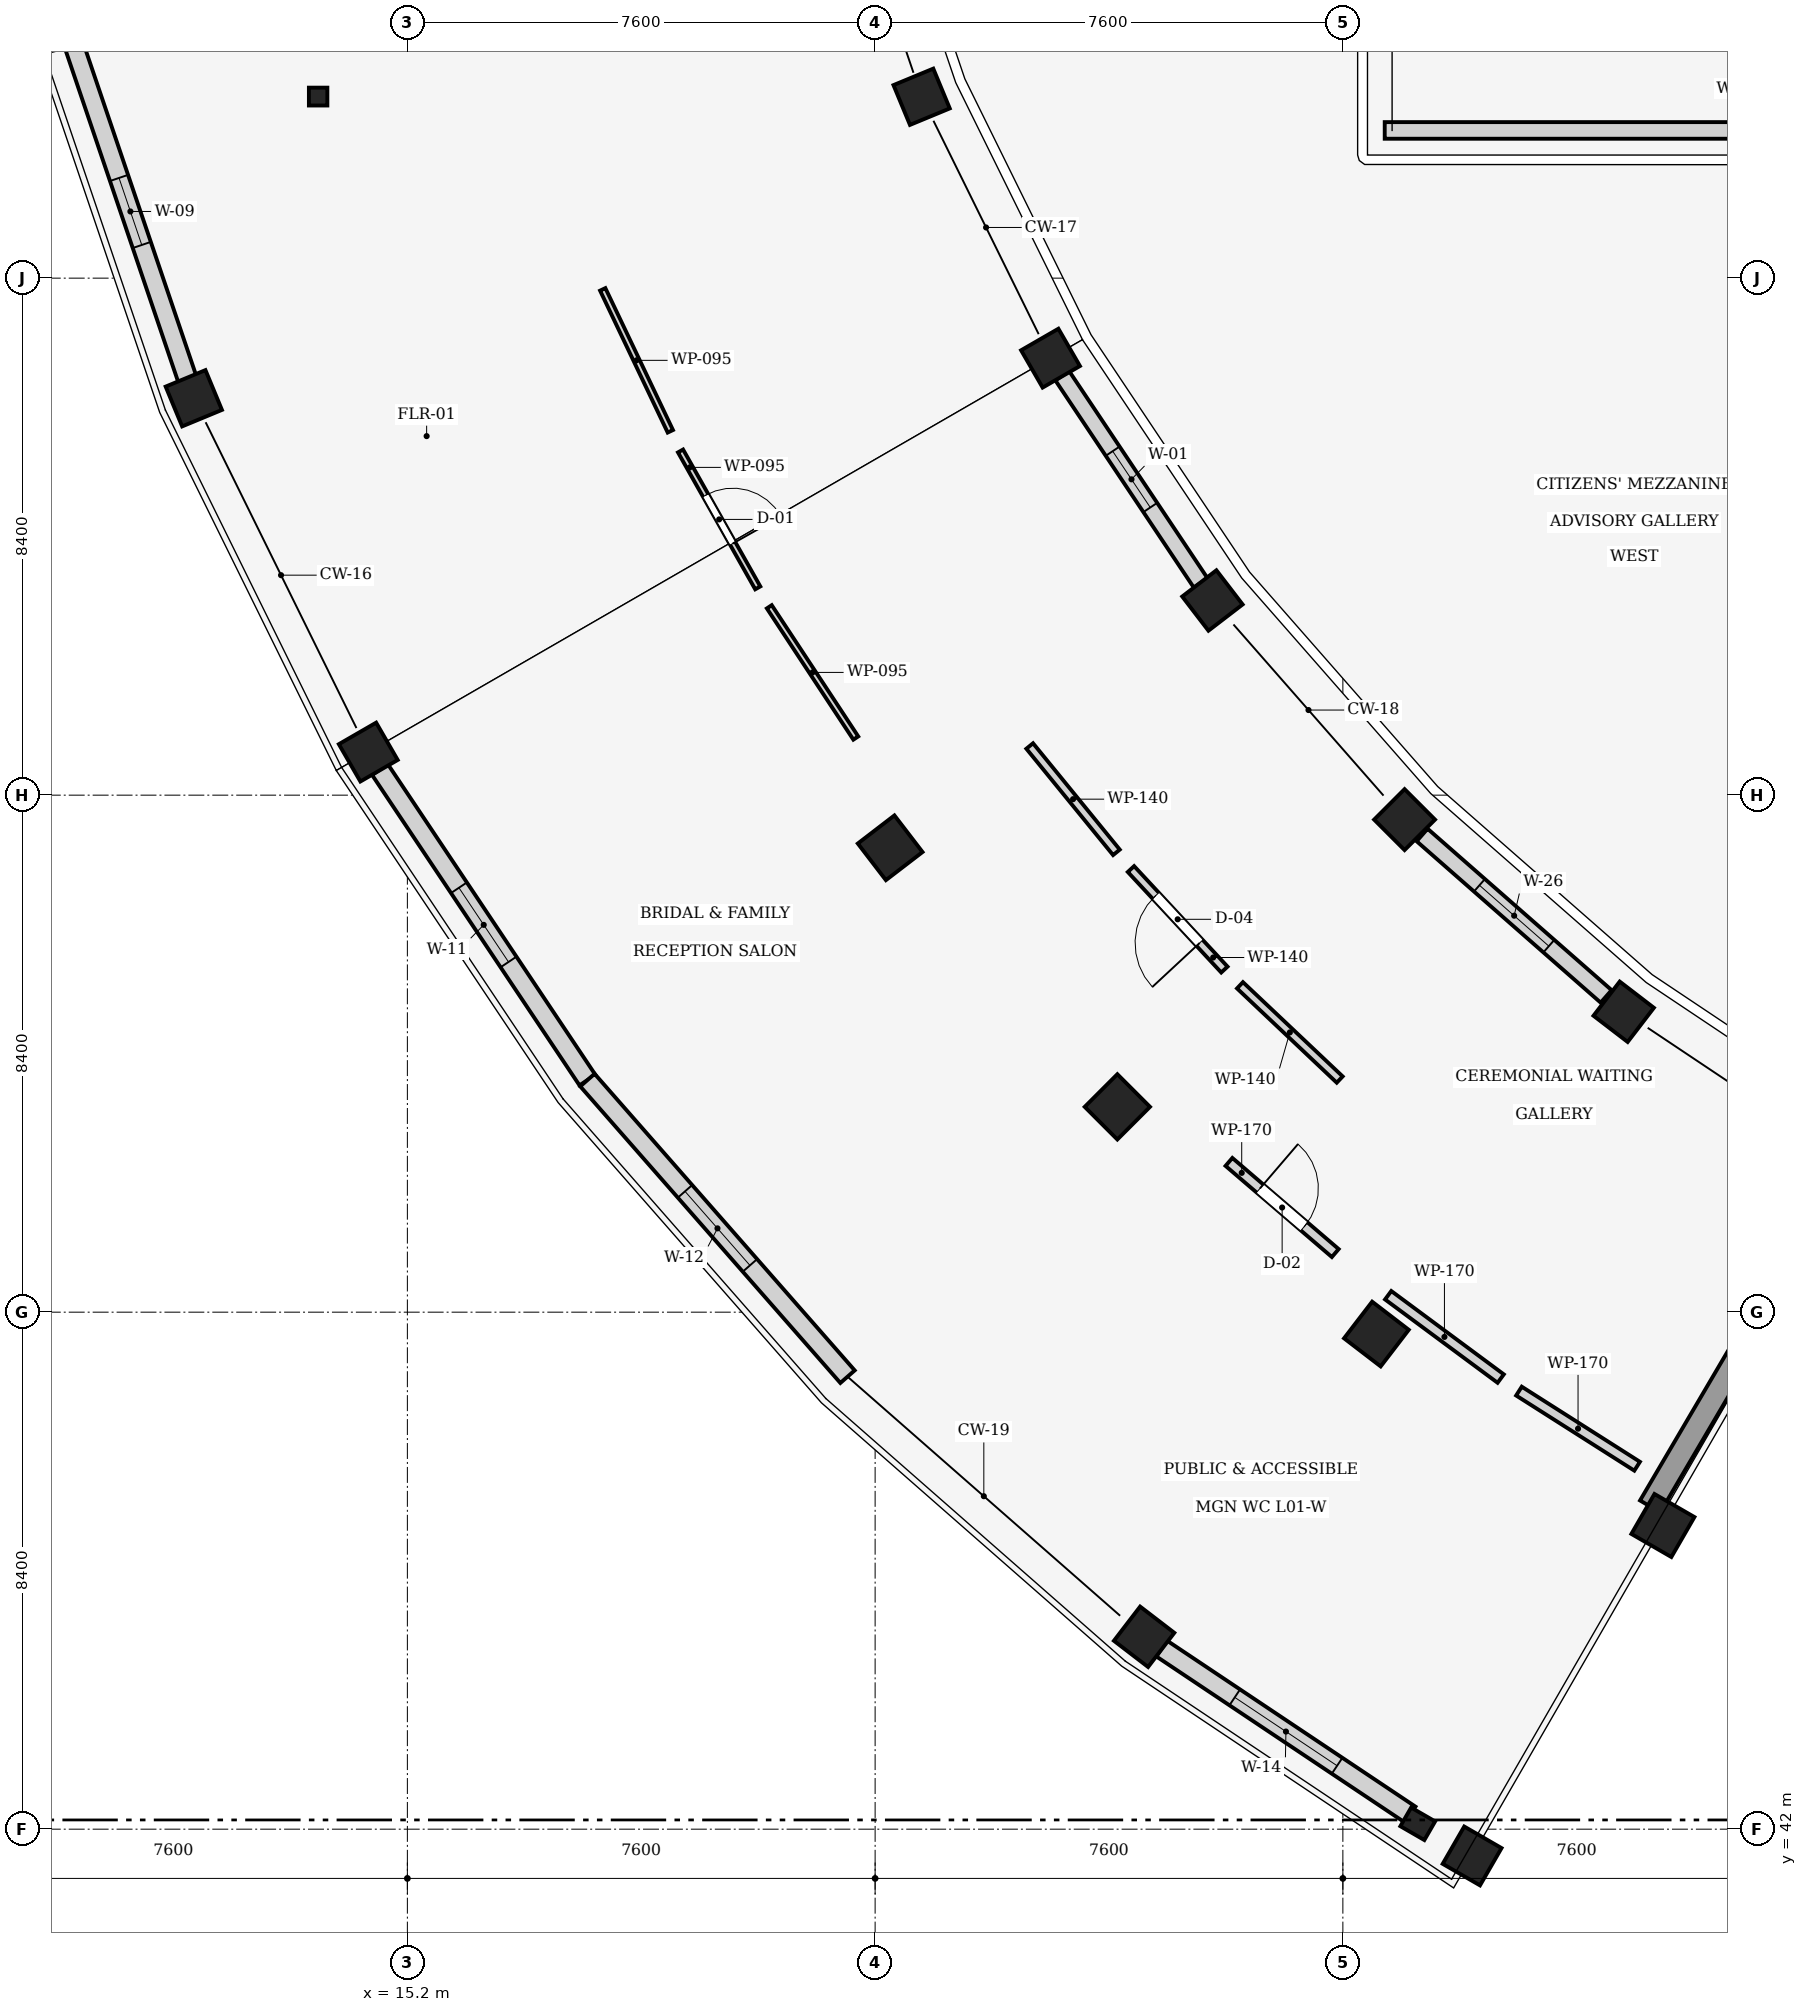
"""IFC4 building model, lengths in metres.
Left out: names, types, materials, properties, quantities, classifications, styles, units other than length and angle.
Written with IfcOpenShell. Run it as: python <this file> out.ifc"""

import sys

from ifc_helpers import new_model, si_unit, direction, frame, frame_2d, origin, origin_2d, place, context, subcontext, project, spatial, rectangle, circle, i_section, extrude, element, fill, save


model = new_model("IFC4")
c1 = context("Model", 3, precision=1e-05, world=origin(), true_north=direction((0.0, 1.0)))
c2 = subcontext(c1, "Body", "Model", "MODEL_VIEW")
j1 = project(units=[si_unit("LENGTHUNIT", "METRE"), si_unit("PLANEANGLEUNIT", "RADIAN")], contexts=[c1])
p1 = place(None, origin())
s1 = spatial("IfcSite", under=j1, at=p1, CompositionType="ELEMENT")
p2 = place(p1, origin())
s2 = spatial("IfcBuilding", under=s1, at=p2, CompositionType="ELEMENT")
p3 = place(p2, frame((0.0, 0.0, 5.1)))
s3 = spatial("IfcBuildingStorey", under=s2, at=p3, CompositionType="ELEMENT", Elevation=5.1)
for number, where, z_axis, x_axis in (
    (1, (23.556, 70.147, 0.0), (0.0, 0.0, 1.0), (-0.924, -0.383, 0.0)),
    (2, (11.73, 65.249, 0.0), (0.0, 0.0, 1.0), (-0.924, -0.383, 0.0)),
    (3, (25.65, 65.9, 0.0), (0.0, 0.0, 1.0), (-0.866, -0.5, 0.0)),
    (4, (14.565, 59.5, 0.0), (0.0, 0.0, 1.0), (-0.866, -0.5, 0.0)),
    (5, (28.281, 61.963, 0.0), (0.0, 0.0, 1.0), (-0.793, -0.609, 0.0)),
):
    element("IfcColumn", number, at=place(p3, frame(where, z_axis=z_axis, x_axis=x_axis)), inside=s3, PredefinedType="COLUMN", context=c2, shape_type="SweptSolid", body=[
        extrude(rectangle(XDim=0.7, YDim=0.7, at=origin_2d()), origin(), (0.0, 0.0, 1.0), 4.05),
    ])
p4 = place(p3, frame((23.044, 57.945, 0.0), z_axis=(0.0, 0.0, 1.0), x_axis=(-0.793353340291, -0.608761429009, 0.0)))
e6 = element("IfcColumn", 6, at=p4, inside=s3, PredefinedType="COLUMN", context=c2, shape_type="SweptSolid", body=[
    extrude(circle(Radius=0.375, at=origin_2d()), origin(), (0.0, 0.0, 1.0), 4.05),
])
p5 = place(p3, frame((31.403, 58.403, 0.0), z_axis=(0.0, 0.0, 1.0), x_axis=(-0.707106781187, -0.707106781187, 0.0)))
e7 = element("IfcColumn", 7, at=p5, inside=s3, PredefinedType="COLUMN", context=c2, shape_type="SweptSolid", body=[
    extrude(rectangle(XDim=0.7, YDim=0.7, at=origin_2d()), origin(), (0.0, 0.0, 1.0), 4.05),
])
p6 = place(p3, frame((26.736, 53.736, 0.0), z_axis=(0.0, 0.0, 1.0), x_axis=(-0.707106781187, -0.707106781187, 0.0)))
e8 = element("IfcColumn", 8, at=p6, inside=s3, PredefinedType="COLUMN", context=c2, shape_type="SweptSolid", body=[
    extrude(circle(Radius=0.375, at=origin_2d()), origin(), (0.0, 0.0, 1.0), 4.05),
])
p7 = place(p3, frame((34.963, 55.281, 0.0), z_axis=(0.0, 0.0, 1.0), x_axis=(-0.608761429009, -0.793353340291, 0.0)))
e9 = element("IfcColumn", 9, at=p7, inside=s3, PredefinedType="COLUMN", context=c2, shape_type="SweptSolid", body=[
    extrude(rectangle(XDim=0.7, YDim=0.7, at=origin_2d()), origin(), (0.0, 0.0, 1.0), 4.05),
])
p8 = place(p3, frame((30.945, 50.044, 0.0), z_axis=(0.0, 0.0, 1.0), x_axis=(-0.608761429009, -0.793353340291, 0.0)))
e10 = element("IfcColumn", 10, at=p8, inside=s3, PredefinedType="COLUMN", context=c2, shape_type="SweptSolid", body=[
    extrude(circle(Radius=0.375, at=origin_2d()), origin(), (0.0, 0.0, 1.0), 4.05),
])
p9 = place(p3, frame((27.171, 45.126, 0.0), z_axis=(0.0, 0.0, 1.0), x_axis=(-0.608761429009, -0.793353340291, 0.0)))
e11 = element("IfcColumn", 11, at=p9, inside=s3, PredefinedType="COLUMN", context=c2, shape_type="SweptSolid", body=[
    extrude(rectangle(XDim=0.7, YDim=0.7, at=origin_2d()), origin(), (0.0, 0.0, 1.0), 4.05),
])
p10 = place(p3, frame((35.6, 46.934, 0.0), z_axis=(0.0, 0.0, 1.0), x_axis=(-0.5, -0.866025403784, 0.0)))
e12 = element("IfcColumn", 12, at=p10, inside=s3, PredefinedType="COLUMN", context=c2, shape_type="SweptSolid", body=[
    extrude(circle(Radius=0.375, at=origin_2d()), origin(), (0.0, 0.0, 1.0), 4.05),
])
p11 = place(p3, frame((32.5, 41.565, 0.0), z_axis=(0.0, 0.0, 1.0), x_axis=(-0.5, -0.866025403784, 0.0)))
e13 = element("IfcColumn", 13, at=p11, inside=s3, PredefinedType="COLUMN", context=c2, shape_type="SweptSolid", body=[
    extrude(rectangle(XDim=0.7, YDim=0.7, at=origin_2d()), origin(), (0.0, 0.0, 1.0), 4.05),
])
p12 = place(p3, frame((31.617, 42.087, 0.0), z_axis=(0.0, 0.0, 1.0), x_axis=(-0.5, -0.866025403784, 0.0)))
e14 = element("IfcColumn", 14, at=p12, inside=s3, PredefinedType="PILASTER", context=c2, shape_type="SweptSolid", body=[
    extrude(rectangle(XDim=0.35, YDim=0.45, at=origin_2d()), origin(), (0.0, 0.0, 1.0), 4.05),
])
p13 = place(p3, frame((13.75, 70.15, 0.0), z_axis=(0.0, 0.0, 1.0), x_axis=(1.0, 0.0, 0.0)))
e15 = element("IfcColumn", 15, at=p13, inside=s3, PredefinedType="COLUMN", context=c2, shape_type="SweptSolid", body=[
    extrude(i_section(OverallWidth=0.3, OverallDepth=0.29, WebThickness=0.009, FlangeThickness=0.014, at=origin_2d()), origin(), (0.0, 0.0, 1.0), 4.05),
])
p14 = place(p3, frame((11.633, 65.533, 0.0), z_axis=(0.0, 0.0, 1.0), x_axis=(-0.321456554182, 0.94692432843, 0.0)))
e16 = element("IfcWall", 16, at=p14, inside=s3, PredefinedType="STANDARD", context=c2, shape_type="SweptSolid", body=[
    extrude(rectangle(XDim=5.808, YDim=0.31, at=frame_2d((2.904, 0.0))), origin(), (0.0, 0.0, 1.0), 3.145),
])
p15 = place(p14, frame((2.329, 0.0, 0.85)))
e17 = element("IfcOpeningElement", 17, at=p15, cuts=e16, PredefinedType="OPENING", context=c2, shape_type="SweptSolid", body=[
    extrude(rectangle(XDim=1.15, YDim=1.5, at=frame_2d((0.575, 0.75))), frame((0.0, 0.165, 0.0), z_axis=(0.0, -1.0, 0.0), x_axis=(1.0, 0.0, 0.0)), (0.0, 0.0, 1.0), 0.33),
])
p16 = place(p3, frame((18.126, 54.171, 0.0), z_axis=(0.0, 0.0, 1.0), x_axis=(-0.555572819865, 0.831467883822, 0.0)))
e18 = element("IfcWall", 18, at=p16, inside=s3, PredefinedType="STANDARD", context=c2, shape_type="SweptSolid", body=[
    extrude(rectangle(XDim=6.067, YDim=0.31, at=frame_2d((3.033, 0.0))), origin(), (0.0, 0.0, 1.0), 3.7),
])
p17 = place(p16, frame((2.308, 0.0, 0.85)))
e19 = element("IfcOpeningElement", 19, at=p17, cuts=e18, PredefinedType="OPENING", context=c2, shape_type="SweptSolid", body=[
    extrude(rectangle(XDim=1.45, YDim=1.5, at=frame_2d((0.725, 0.75))), frame((0.0, 0.165, 0.0), z_axis=(0.0, -1.0, 0.0), x_axis=(1.0, 0.0, 0.0)), (0.0, 0.0, 1.0), 0.33),
])
p18 = place(p3, frame((25.84, 65.615, 0.0), z_axis=(0.0, 0.0, 1.0), x_axis=(0.555548569055, -0.831484087293, 0.0)))
e20 = element("IfcWall", 20, at=p18, inside=s3, PredefinedType="STANDARD", context=c2, shape_type="SweptSolid", body=[
    extrude(rectangle(XDim=4.05, YDim=0.27, at=frame_2d((2.025, 0.0))), origin(), (0.0, 0.0, 1.0), 3.145),
])
p19 = place(p18, frame((1.475, 0.0, 0.85)))
e21 = element("IfcOpeningElement", 21, at=p19, cuts=e20, PredefinedType="OPENING", context=c2, shape_type="SweptSolid", body=[
    extrude(rectangle(XDim=1.1, YDim=1.35, at=frame_2d((0.55, 0.675))), frame((0.0, 0.145, 0.0), z_axis=(0.0, -1.0, 0.0), x_axis=(1.0, 0.0, 0.0)), (0.0, 0.0, 1.0), 0.29),
])
p20 = place(p3, frame((22.352, 49.352, 0.0), z_axis=(0.0, 0.0, 1.0), x_axis=(-0.659350951881, 0.751835302612, 0.0)))
e22 = element("IfcWall", 22, at=p20, inside=s3, PredefinedType="STANDARD", context=c2, shape_type="SweptSolid", body=[
    extrude(rectangle(XDim=6.409, YDim=0.31, at=frame_2d((3.205, 0.0))), origin(), (0.0, 0.0, 1.0), 3.7),
])
p21 = place(p20, frame((2.405, 0.0, 0.85)))
e23 = element("IfcOpeningElement", 23, at=p21, cuts=e22, PredefinedType="OPENING", context=c2, shape_type="SweptSolid", body=[
    extrude(rectangle(XDim=1.6, YDim=1.5, at=frame_2d((0.8, 0.75))), frame((0.0, 0.165, 0.0), z_axis=(0.0, -1.0, 0.0), x_axis=(1.0, 0.0, 0.0)), (0.0, 0.0, 1.0), 0.33),
])
p22 = place(p3, frame((31.688, 58.153, 0.0), z_axis=(0.0, 0.0, 1.0), x_axis=(0.751819440649, -0.659369038296, 0.0)))
e24 = element("IfcWall", 24, at=p22, inside=s3, PredefinedType="STANDARD", context=c2, shape_type="SweptSolid", body=[
    extrude(rectangle(XDim=3.977, YDim=0.27, at=frame_2d((1.989, 0.0))), origin(), (0.0, 0.0, 1.0), 3.145),
])
p23 = place(p22, frame((1.239, 0.0, 0.85)))
e25 = element("IfcOpeningElement", 25, at=p23, cuts=e24, PredefinedType="OPENING", context=c2, shape_type="SweptSolid", body=[
    extrude(rectangle(XDim=1.5, YDim=1.85, at=frame_2d((0.75, 0.925))), frame((0.0, 0.145, 0.0), z_axis=(0.0, -1.0, 0.0), x_axis=(1.0, 0.0, 0.0)), (0.0, 0.0, 1.0), 0.29),
])
p24 = place(p3, frame((31.494, 42.237, 0.0), z_axis=(0.0, 0.0, 1.0), x_axis=(-0.83146976308, 0.555570007365, 0.0)))
e26 = element("IfcWall", 26, at=p24, inside=s3, PredefinedType="STANDARD", context=c2, shape_type="SweptSolid", body=[
    extrude(rectangle(XDim=4.856, YDim=0.31, at=frame_2d((2.428, 0.0))), origin(), (0.0, 0.0, 1.0), 3.145),
])
p25 = place(p24, frame((1.428, 0.0, 0.85)))
e27 = element("IfcOpeningElement", 27, at=p25, cuts=e26, PredefinedType="OPENING", context=c2, shape_type="SweptSolid", body=[
    extrude(rectangle(XDim=2.0, YDim=1.5, at=frame_2d((1.0, 0.75))), frame((0.0, 0.165, 0.0), z_axis=(0.0, -1.0, 0.0), x_axis=(1.0, 0.0, 0.0)), (0.0, 0.0, 1.0), 0.33),
])
p26 = place(p3, frame((38.477, 52.491, 0.0), z_axis=(0.0, 0.0, 1.0), x_axis=(-0.506800995465, -0.862063078316, 0.0)))
e28 = element("IfcWall", 28, at=p26, inside=s3, PredefinedType="SHEAR", context=c2, shape_type="SweptSolid", body=[
    extrude(rectangle(XDim=6.087, YDim=0.38, at=frame_2d((3.043, 0.0))), origin(), (0.0, 0.0, 1.0), 3.75),
])
p27 = place(p3, frame((42.72, 69.6, 0.0), z_axis=(0.0, 0.0, 1.0), x_axis=(-1.0, 0.0, 0.0)))
e29 = element("IfcWall", 29, at=p27, inside=s3, PredefinedType="STANDARD", context=c2, shape_type="SweptSolid", body=[
    extrude(rectangle(XDim=11.64, YDim=0.27, at=frame_2d((5.82, 0.0))), origin(), (0.0, 0.0, 1.0), 3.7),
])
p28 = place(p3, frame((19.638, 64.392, 0.0), z_axis=(0.0, 0.0, 1.0), x_axis=(0.491313749773, -0.870982663022, 0.0)))
e30 = element("IfcWall", 30, at=p28, inside=s3, PredefinedType="PARTITIONING", context=c2, shape_type="SweptSolid", body=[
    extrude(rectangle(XDim=2.554, YDim=0.095, at=frame_2d((1.277, 0.0))), origin(), (0.0, 0.0, 1.0), 3.68),
])
p29 = place(p28, frame((0.827, 0.0, 0.0)))
e31 = element("IfcOpeningElement", 31, at=p29, cuts=e30, PredefinedType="OPENING", context=c2, shape_type="SweptSolid", body=[
    extrude(rectangle(XDim=0.9, YDim=2.1, at=frame_2d((0.45, 1.05))), frame((0.0, 0.057, 0.0), z_axis=(0.0, -1.0, 0.0), x_axis=(1.0, 0.0, 0.0)), (0.0, 0.0, 1.0), 0.115),
])
for number, where, z_axis, x_axis in (
    (32, (21.081, 61.861, 0.0), (0.0, 0.0, 1.0), (0.55, -0.835, 0.0)),
    (33, (18.374, 67.018, 0.0), (0.0, 0.0, 1.0), (0.43, -0.903, 0.0)),
):
    element("IfcWall", number, at=place(p3, frame(where, z_axis=z_axis, x_axis=x_axis)), inside=s3, PredefinedType="PARTITIONING", context=c2, shape_type="SweptSolid", body=[
        extrude(rectangle(XDim=2.554, YDim=0.095, at=frame_2d((1.277, 0.0))), origin(), (0.0, 0.0, 1.0), 3.68),
    ])
p30 = place(p3, frame((28.549, 52.841, 0.0), z_axis=(0.0, 0.0, 1.0), x_axis=(0.759218726938, -0.650835558852, 0.0)))
e34 = element("IfcWall", 34, at=p30, inside=s3, PredefinedType="PARTITIONING", context=c2, shape_type="SweptSolid", body=[
    extrude(rectangle(XDim=2.275, YDim=0.17, at=frame_2d((1.138, 0.0))), origin(), (0.0, 0.0, 1.0), 3.68),
])
p31 = place(p30, frame((0.663, 0.0, 0.0)))
e35 = element("IfcOpeningElement", 35, at=p31, cuts=e34, PredefinedType="OPENING", context=c2, shape_type="SweptSolid", body=[
    extrude(rectangle(XDim=0.95, YDim=2.1, at=frame_2d((0.475, 1.05))), frame((0.0, 0.095, 0.0), z_axis=(0.0, -1.0, 0.0), x_axis=(1.0, 0.0, 0.0)), (0.0, 0.0, 1.0), 0.19),
])
p32 = place(p3, frame((31.136, 50.675, 0.0), z_axis=(0.0, 0.0, 1.0), x_axis=(0.803629423088, -0.595130028101, 0.0)))
e36 = element("IfcWall", 36, at=p32, inside=s3, PredefinedType="PARTITIONING", context=c2, shape_type="SweptSolid", body=[
    extrude(rectangle(XDim=2.275, YDim=0.17, at=frame_2d((1.138, 0.0))), origin(), (0.0, 0.0, 1.0), 2.995),
])
p33 = place(p3, frame((33.261, 49.117, 0.0), z_axis=(0.0, 0.0, 1.0), x_axis=(0.843952980102, -0.536417157982, 0.0)))
e37 = element("IfcWall", 37, at=p33, inside=s3, PredefinedType="PARTITIONING", context=c2, shape_type="SweptSolid", body=[
    extrude(rectangle(XDim=2.275, YDim=0.17, at=frame_2d((1.138, 0.0))), origin(), (0.0, 0.0, 1.0), 3.68),
])
p34 = place(p3, frame((28.475, 55.966, 0.0), z_axis=(0.0, 0.0, 1.0), x_axis=(-0.680795385987, 0.732473646229, 0.0)))
e38 = element("IfcWall", 38, at=p34, inside=s3, PredefinedType="PARTITIONING", context=c2, shape_type="SweptSolid", body=[
    extrude(rectangle(XDim=2.23, YDim=0.14, at=frame_2d((1.115, 0.0))), origin(), (0.0, 0.0, 1.0), 2.995),
])
p35 = place(p34, frame((0.59, 0.0, 0.0)))
e39 = element("IfcOpeningElement", 39, at=p35, cuts=e38, PredefinedType="OPENING", context=c2, shape_type="SweptSolid", body=[
    extrude(rectangle(XDim=1.05, YDim=2.1, at=frame_2d((0.525, 1.05))), frame((0.0, 0.08, 0.0), z_axis=(0.0, -1.0, 0.0), x_axis=(1.0, 0.0, 0.0)), (0.0, 0.0, 1.0), 0.16),
])
p36 = place(p3, frame((26.721, 57.871, 0.0), z_axis=(0.0, 0.0, 1.0), x_axis=(-0.631919089096, 0.775034363649, 0.0)))
e40 = element("IfcWall", 40, at=p36, inside=s3, PredefinedType="PARTITIONING", context=c2, shape_type="SweptSolid", body=[
    extrude(rectangle(XDim=2.229, YDim=0.14, at=frame_2d((1.115, 0.0))), origin(), (0.0, 0.0, 1.0), 2.995),
])
p37 = place(p3, frame((30.349, 54.179, 0.0), z_axis=(0.0, 0.0, 1.0), x_axis=(-0.726700318569, 0.686954617855, 0.0)))
e41 = element("IfcWall", 41, at=p37, inside=s3, PredefinedType="PARTITIONING", context=c2, shape_type="SweptSolid", body=[
    extrude(rectangle(XDim=2.23, YDim=0.14, at=frame_2d((1.115, 0.0))), origin(), (0.0, 0.0, 1.0), 2.995),
])
p38 = place(p15, origin())
e42 = element("IfcWindow", 42, at=p38, inside=s3, PartitioningType="SINGLE_PANEL", PredefinedType="WINDOW", context=c2, shape_type="SweptSolid", body=[
    extrude(rectangle(XDim=1.15, YDim=1.5, at=frame_2d((0.575, 0.75))), frame((0.0, 0.03, 0.0), z_axis=(0.0, -1.0, 0.0), x_axis=(1.0, 0.0, 0.0)), (0.0, 0.0, 1.0), 0.06),
])
fill(e17, e42)
p39 = place(p17, origin())
e43 = element("IfcWindow", 43, at=p39, inside=s3, PartitioningType="SINGLE_PANEL", PredefinedType="WINDOW", context=c2, shape_type="SweptSolid", body=[
    extrude(rectangle(XDim=1.45, YDim=1.5, at=frame_2d((0.725, 0.75))), frame((0.0, 0.03, 0.0), z_axis=(0.0, -1.0, 0.0), x_axis=(1.0, 0.0, 0.0)), (0.0, 0.0, 1.0), 0.06),
])
fill(e19, e43)
p40 = place(p19, origin())
e44 = element("IfcWindow", 44, at=p40, inside=s3, PartitioningType="SINGLE_PANEL", PredefinedType="WINDOW", context=c2, shape_type="SweptSolid", body=[
    extrude(rectangle(XDim=1.1, YDim=1.35, at=frame_2d((0.55, 0.675))), frame((0.0, 0.03, 0.0), z_axis=(0.0, -1.0, 0.0), x_axis=(1.0, 0.0, 0.0)), (0.0, 0.0, 1.0), 0.06),
])
fill(e21, e44)
p41 = place(p21, origin())
e45 = element("IfcWindow", 45, at=p41, inside=s3, PartitioningType="SINGLE_PANEL", PredefinedType="WINDOW", context=c2, shape_type="SweptSolid", body=[
    extrude(rectangle(XDim=1.6, YDim=1.5, at=frame_2d((0.8, 0.75))), frame((0.0, 0.03, 0.0), z_axis=(0.0, -1.0, 0.0), x_axis=(1.0, 0.0, 0.0)), (0.0, 0.0, 1.0), 0.06),
])
fill(e23, e45)
p42 = place(p23, origin())
e46 = element("IfcWindow", 46, at=p42, inside=s3, PartitioningType="SINGLE_PANEL", PredefinedType="WINDOW", context=c2, shape_type="SweptSolid", body=[
    extrude(rectangle(XDim=1.5, YDim=1.85, at=frame_2d((0.75, 0.925))), frame((0.0, 0.03, 0.0), z_axis=(0.0, -1.0, 0.0), x_axis=(1.0, 0.0, 0.0)), (0.0, 0.0, 1.0), 0.06),
])
fill(e25, e46)
p43 = place(p25, origin())
e47 = element("IfcWindow", 47, at=p43, inside=s3, PartitioningType="SINGLE_PANEL", PredefinedType="WINDOW", context=c2, shape_type="SweptSolid", body=[
    extrude(rectangle(XDim=2.0, YDim=1.5, at=frame_2d((1.0, 0.75))), frame((0.0, 0.03, 0.0), z_axis=(0.0, -1.0, 0.0), x_axis=(1.0, 0.0, 0.0)), (0.0, 0.0, 1.0), 0.06),
])
fill(e27, e47)
p44 = place(p29, origin())
e48 = element("IfcDoor", 48, at=p44, inside=s3, OperationType="SINGLE_SWING_RIGHT", PredefinedType="DOOR", context=c2, shape_type="SweptSolid", body=[
    extrude(rectangle(XDim=0.9, YDim=2.1, at=frame_2d((0.45, 1.05))), frame((0.0, 0.025, 0.0), z_axis=(0.0, -1.0, 0.0), x_axis=(1.0, 0.0, 0.0)), (0.0, 0.0, 1.0), 0.05),
])
fill(e31, e48)
p45 = place(p31, origin())
e49 = element("IfcDoor", 49, at=p45, inside=s3, OperationType="SINGLE_SWING_LEFT", PredefinedType="DOOR", context=c2, shape_type="SweptSolid", body=[
    extrude(rectangle(XDim=0.95, YDim=2.1, at=frame_2d((0.475, 1.05))), frame((0.0, 0.025, 0.0), z_axis=(0.0, -1.0, 0.0), x_axis=(1.0, 0.0, 0.0)), (0.0, 0.0, 1.0), 0.05),
])
fill(e35, e49)
p46 = place(p35, origin())
e50 = element("IfcDoor", 50, at=p46, inside=s3, OperationType="SINGLE_SWING_LEFT", PredefinedType="DOOR", context=c2, shape_type="SweptSolid", body=[
    extrude(rectangle(XDim=1.05, YDim=2.1, at=frame_2d((0.525, 1.05))), frame((0.0, 0.025, 0.0), z_axis=(0.0, -1.0, 0.0), x_axis=(1.0, 0.0, 0.0)), (0.0, 0.0, 1.0), 0.05),
])
fill(e39, e50)
save(model, sys.argv[1])
